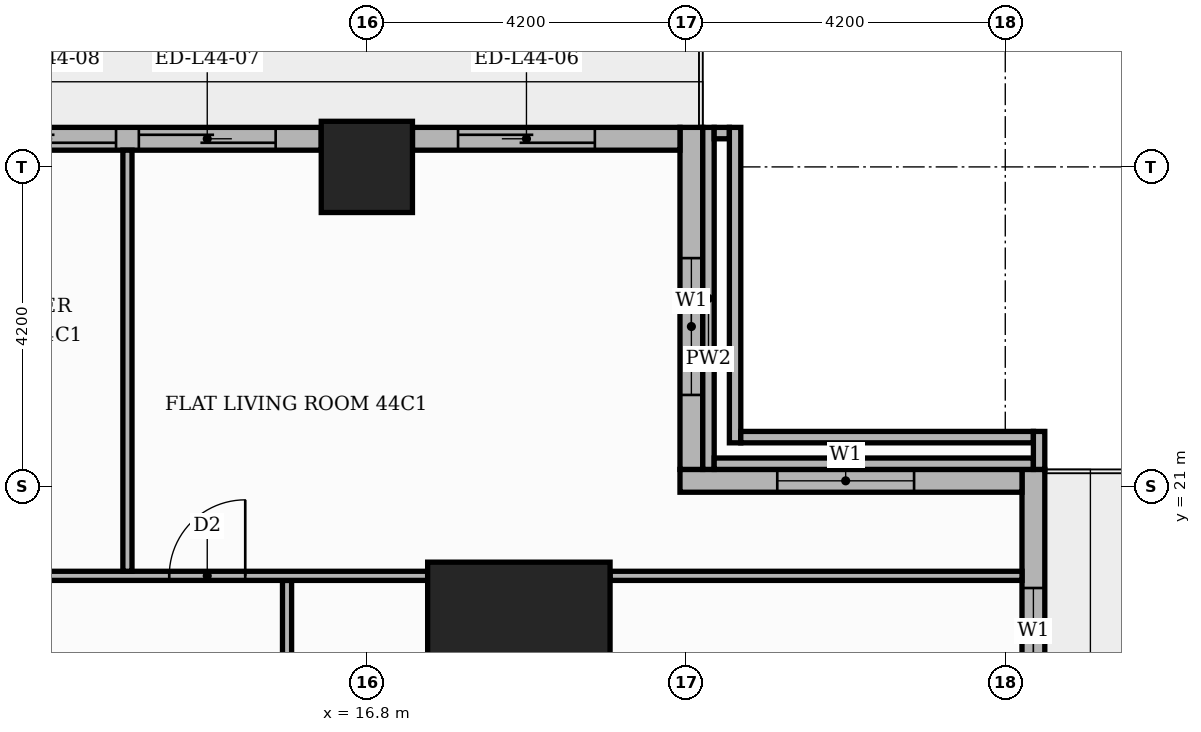
"""IFC4 building model, lengths in metres.
Left out: names, types, materials, properties, quantities, classifications, styles, units other than length and angle.
Written with IfcOpenShell. Run it as: python <this file> out.ifc"""

import sys

from ifc_helpers import new_model, si_unit, direction, frame, frame_2d, origin, origin_2d, place, context, subcontext, project, spatial, rectangle, extrude, element, fill, save


model = new_model("IFC4")
c1 = context("Model", 3, precision=1e-05, world=origin(), true_north=direction((0.0, 1.0)))
c2 = subcontext(c1, "Body", "Model", "MODEL_VIEW")
j1 = project(units=[si_unit("LENGTHUNIT", "METRE"), si_unit("PLANEANGLEUNIT", "RADIAN")], contexts=[c1])
p1 = place(None, origin())
s1 = spatial("IfcSite", under=j1, at=p1, CompositionType="ELEMENT")
p2 = place(p1, origin())
s2 = spatial("IfcBuilding", under=s1, at=p2, CompositionType="ELEMENT")
p3 = place(p2, frame((0.0, 0.0, 188.4)))
s3 = spatial("IfcBuildingStorey", under=s2, at=p3, CompositionType="ELEMENT", Elevation=188.4)
p4 = place(p3, frame((18.8, 18.8, 0.0), z_axis=(0.0, 0.0, 1.0), x_axis=(1.0, 0.0, 0.0)))
e1 = element("IfcColumn", 1, at=p4, inside=s3, PredefinedType="COLUMN", context=c2, shape_type="SweptSolid", body=[
    extrude(rectangle(XDim=2.4, YDim=2.4, at=origin_2d()), origin(), (0.0, 0.0, 1.0), 3.9),
])
p5 = place(p3, frame((16.8, 25.2, 0.0), z_axis=(0.0, 0.0, 1.0), x_axis=(1.0, 0.0, 0.0)))
e2 = element("IfcColumn", 2, at=p5, inside=s3, PredefinedType="COLUMN", context=c2, shape_type="SweptSolid", body=[
    extrude(rectangle(XDim=1.2, YDim=1.2, at=origin_2d()), origin(), (0.0, 0.0, 1.0), 3.9),
])
p6 = place(p3, frame((25.57, 17.4, 0.0), z_axis=(0.0, 0.0, 1.0), x_axis=(0.0, 1.0, 0.0)))
e3 = element("IfcWall", 3, at=p6, inside=s3, PredefinedType="STANDARD", context=c2, shape_type="SweptSolid", body=[
    extrude(rectangle(XDim=3.82, YDim=0.3, at=frame_2d((1.91, 0.0))), origin(), (0.0, 0.0, 1.0), 3.48),
])
p7 = place(p6, frame((0.46, 0.0, 0.9)))
e4 = element("IfcOpeningElement", 4, at=p7, cuts=e3, PredefinedType="OPENING", context=c2, shape_type="SweptSolid", body=[
    extrude(rectangle(XDim=1.8, YDim=2.1, at=frame_2d((0.9, 1.05))), frame((0.0, 0.16, 0.0), z_axis=(0.0, -1.0, 0.0), x_axis=(1.0, 0.0, 0.0)), (0.0, 0.0, 1.0), 0.32),
])
p8 = place(p3, frame((25.42, 21.07, 0.0), z_axis=(0.0, 0.0, 1.0), x_axis=(-1.0, 0.0, 0.0)))
e5 = element("IfcWall", 5, at=p8, inside=s3, PredefinedType="STANDARD", context=c2, shape_type="SweptSolid", body=[
    extrude(rectangle(XDim=4.5, YDim=0.3, at=frame_2d((2.25, 0.0))), origin(), (0.0, 0.0, 1.0), 3.48),
])
p9 = place(p8, frame((1.42, 0.0, 0.9)))
e6 = element("IfcOpeningElement", 6, at=p9, cuts=e5, PredefinedType="OPENING", context=c2, shape_type="SweptSolid", body=[
    extrude(rectangle(XDim=1.8, YDim=2.1, at=frame_2d((0.9, 1.05))), frame((0.0, 0.16, 0.0), z_axis=(0.0, -1.0, 0.0), x_axis=(1.0, 0.0, 0.0)), (0.0, 0.0, 1.0), 0.32),
])
p10 = place(p3, frame((21.07, 21.22, 0.0), z_axis=(0.0, 0.0, 1.0), x_axis=(0.0, 1.0, 0.0)))
e7 = element("IfcWall", 7, at=p10, inside=s3, PredefinedType="STANDARD", context=c2, shape_type="SweptSolid", body=[
    extrude(rectangle(XDim=4.5, YDim=0.3, at=frame_2d((2.25, 0.0))), origin(), (0.0, 0.0, 1.0), 3.48),
])
p11 = place(p10, frame((0.98, 0.0, 0.9)))
e8 = element("IfcOpeningElement", 8, at=p11, cuts=e7, PredefinedType="OPENING", context=c2, shape_type="SweptSolid", body=[
    extrude(rectangle(XDim=1.8, YDim=2.1, at=frame_2d((0.9, 1.05))), frame((0.0, 0.16, 0.0), z_axis=(0.0, -1.0, 0.0), x_axis=(1.0, 0.0, 0.0)), (0.0, 0.0, 1.0), 0.32),
])
p12 = place(p3, frame((20.92, 25.57, 0.0), z_axis=(0.0, 0.0, 1.0), x_axis=(-1.0, 0.0, 0.0)))
e9 = element("IfcWall", 9, at=p12, inside=s3, PredefinedType="STANDARD", context=c2, shape_type="SweptSolid", body=[
    extrude(rectangle(XDim=3.52, YDim=0.3, at=frame_2d((1.76, 0.0))), origin(), (0.0, 0.0, 1.0), 3.48),
])
p13 = place(p12, frame((1.12, 0.0, 0.0)))
e10 = element("IfcOpeningElement", 10, at=p13, cuts=e9, PredefinedType="OPENING", context=c2, shape_type="SweptSolid", body=[
    extrude(rectangle(XDim=1.8, YDim=2.4, at=frame_2d((0.9, 1.2))), frame((0.0, 0.16, 0.0), z_axis=(0.0, -1.0, 0.0), x_axis=(1.0, 0.0, 0.0)), (0.0, 0.0, 1.0), 0.32),
])
p14 = place(p3, frame((16.2, 25.57, 0.0), z_axis=(0.0, 0.0, 1.0), x_axis=(-1.0, 0.0, 0.0)))
e11 = element("IfcWall", 11, at=p14, inside=s3, PredefinedType="STANDARD", context=c2, shape_type="SweptSolid", body=[
    extrude(rectangle(XDim=7.2, YDim=0.3, at=frame_2d((3.6, 0.0))), origin(), (0.0, 0.0, 1.0), 3.48),
])
p15 = place(p14, frame((0.6, 0.0, 0.0)))
e12 = element("IfcOpeningElement", 12, at=p15, cuts=e11, PredefinedType="OPENING", context=c2, shape_type="SweptSolid", body=[
    extrude(rectangle(XDim=1.8, YDim=2.4, at=frame_2d((0.9, 1.2))), frame((0.0, 0.16, 0.0), z_axis=(0.0, -1.0, 0.0), x_axis=(1.0, 0.0, 0.0)), (0.0, 0.0, 1.0), 0.32),
])
p16 = place(p14, frame((2.7, 0.0, 0.0)))
e13 = element("IfcOpeningElement", 13, at=p16, cuts=e11, PredefinedType="OPENING", context=c2, shape_type="SweptSolid", body=[
    extrude(rectangle(XDim=1.8, YDim=2.4, at=frame_2d((0.9, 1.2))), frame((0.0, 0.16, 0.0), z_axis=(0.0, -1.0, 0.0), x_axis=(1.0, 0.0, 0.0)), (0.0, 0.0, 1.0), 0.32),
])
p17 = place(p14, frame((4.8, 0.0, 0.9)))
e14 = element("IfcOpeningElement", 14, at=p17, cuts=e11, PredefinedType="OPENING", context=c2, shape_type="SweptSolid", body=[
    extrude(rectangle(XDim=1.8, YDim=2.1, at=frame_2d((0.9, 1.05))), frame((0.0, 0.16, 0.0), z_axis=(0.0, -1.0, 0.0), x_axis=(1.0, 0.0, 0.0)), (0.0, 0.0, 1.0), 0.32),
])
p18 = place(p3, frame((21.295, 21.22, 0.0), z_axis=(0.0, 0.0, 1.0), x_axis=(0.0, 1.0, 0.0)))
e15 = element("IfcWall", 15, at=p18, inside=s3, PredefinedType="PARAPET", context=c2, shape_type="SweptSolid", body=[
    extrude(rectangle(XDim=4.5, YDim=0.15, at=frame_2d((2.25, 0.0))), origin(), (0.0, 0.0, 1.0), 1.1),
])
p19 = place(p3, frame((21.37, 25.645, 0.0), z_axis=(0.0, 0.0, 1.0), x_axis=(1.0, 0.0, 0.0)))
e16 = element("IfcWall", 16, at=p19, inside=s3, PredefinedType="PARAPET", context=c2, shape_type="SweptSolid", body=[
    extrude(rectangle(XDim=0.2, YDim=0.15, at=frame_2d((0.1, 0.0))), origin(), (0.0, 0.0, 1.0), 1.1),
])
p20 = place(p3, frame((21.37, 21.295, 0.0), z_axis=(0.0, 0.0, 1.0), x_axis=(1.0, 0.0, 0.0)))
e17 = element("IfcWall", 17, at=p20, inside=s3, PredefinedType="PARAPET", context=c2, shape_type="SweptSolid", body=[
    extrude(rectangle(XDim=4.2, YDim=0.15, at=frame_2d((2.1, 0.0))), origin(), (0.0, 0.0, 1.0), 1.1),
])
p21 = place(p3, frame((21.645, 21.57, 0.0), z_axis=(0.0, 0.0, 1.0), x_axis=(0.0, 1.0, 0.0)))
e18 = element("IfcWall", 18, at=p21, inside=s3, PredefinedType="PARAPET", context=c2, shape_type="SweptSolid", body=[
    extrude(rectangle(XDim=4.15, YDim=0.15, at=frame_2d((2.075, 0.0))), origin(), (0.0, 0.0, 1.0), 1.1),
])
p22 = place(p3, frame((21.72, 21.645, 0.0), z_axis=(0.0, 0.0, 1.0), x_axis=(1.0, 0.0, 0.0)))
e19 = element("IfcWall", 19, at=p22, inside=s3, PredefinedType="PARAPET", context=c2, shape_type="SweptSolid", body=[
    extrude(rectangle(XDim=3.85, YDim=0.15, at=frame_2d((1.925, 0.0))), origin(), (0.0, 0.0, 1.0), 1.1),
])
p23 = place(p3, frame((25.645, 21.22, 0.0), z_axis=(0.0, 0.0, 1.0), x_axis=(0.0, 1.0, 0.0)))
e20 = element("IfcWall", 20, at=p23, inside=s3, PredefinedType="PARAPET", context=c2, shape_type="SweptSolid", body=[
    extrude(rectangle(XDim=0.5, YDim=0.15, at=frame_2d((0.25, 0.0))), origin(), (0.0, 0.0, 1.0), 1.1),
])
p24 = place(p3, frame((15.75, 13.75, 0.0), z_axis=(0.0, 0.0, 1.0), x_axis=(0.0, 1.0, 0.0)))
e21 = element("IfcWall", 21, at=p24, inside=s3, PredefinedType="PARTITIONING", context=c2, shape_type="SweptSolid", body=[
    extrude(rectangle(XDim=6.01, YDim=0.12, at=frame_2d((3.005, 0.0))), origin(), (0.0, 0.0, 1.0), 3.48),
])
p25 = place(p24, frame((2.485, 0.0, 0.0)))
e22 = element("IfcOpeningElement", 22, at=p25, cuts=e21, PredefinedType="OPENING", context=c2, shape_type="SweptSolid", body=[
    extrude(rectangle(XDim=1.0, YDim=2.1, at=frame_2d((0.5, 1.05))), frame((0.0, 0.07, 0.0), z_axis=(0.0, -1.0, 0.0), x_axis=(1.0, 0.0, 0.0)), (0.0, 0.0, 1.0), 0.14),
])
p26 = place(p3, frame((5.35, 19.82, 0.0), z_axis=(0.0, 0.0, 1.0), x_axis=(1.0, 0.0, 0.0)))
e23 = element("IfcWall", 23, at=p26, inside=s3, PredefinedType="PARTITIONING", context=c2, shape_type="SweptSolid", body=[
    extrude(rectangle(XDim=12.25, YDim=0.12, at=frame_2d((6.125, 0.0))), origin(), (0.0, 0.0, 1.0), 3.48),
])
p27 = place(p26, frame((8.85, 0.0, 0.0)))
e24 = element("IfcOpeningElement", 24, at=p27, cuts=e23, PredefinedType="OPENING", context=c2, shape_type="SweptSolid", body=[
    extrude(rectangle(XDim=1.0, YDim=2.1, at=frame_2d((0.5, 1.05))), frame((0.0, 0.07, 0.0), z_axis=(0.0, -1.0, 0.0), x_axis=(1.0, 0.0, 0.0)), (0.0, 0.0, 1.0), 0.14),
])
p28 = place(p26, frame((5.75, 0.0, 0.0)))
e25 = element("IfcOpeningElement", 25, at=p28, cuts=e23, PredefinedType="OPENING", context=c2, shape_type="SweptSolid", body=[
    extrude(rectangle(XDim=0.9, YDim=2.1, at=frame_2d((0.45, 1.05))), frame((0.0, 0.07, 0.0), z_axis=(0.0, -1.0, 0.0), x_axis=(1.0, 0.0, 0.0)), (0.0, 0.0, 1.0), 0.14),
])
p29 = place(p3, frame((20.0, 19.82, 0.0), z_axis=(0.0, 0.0, 1.0), x_axis=(1.0, 0.0, 0.0)))
e26 = element("IfcWall", 26, at=p29, inside=s3, PredefinedType="PARTITIONING", context=c2, shape_type="SweptSolid", body=[
    extrude(rectangle(XDim=5.42, YDim=0.12, at=frame_2d((2.71, 0.0))), origin(), (0.0, 0.0, 1.0), 3.48),
])
p30 = place(p3, frame((13.65, 19.88, 0.0), z_axis=(0.0, 0.0, 1.0), x_axis=(0.0, 1.0, 0.0)))
e27 = element("IfcWall", 27, at=p30, inside=s3, PredefinedType="PARTITIONING", context=c2, shape_type="SweptSolid", body=[
    extrude(rectangle(XDim=5.54, YDim=0.12, at=frame_2d((2.77, 0.0))), origin(), (0.0, 0.0, 1.0), 3.48),
])
p31 = place(p7, origin())
e28 = element("IfcWindow", 28, at=p31, inside=s3, PartitioningType="SINGLE_PANEL", PredefinedType="WINDOW", context=c2, shape_type="SweptSolid", body=[
    extrude(rectangle(XDim=1.8, YDim=2.1, at=frame_2d((0.9, 1.05))), frame((0.0, 0.03, 0.0), z_axis=(0.0, -1.0, 0.0), x_axis=(1.0, 0.0, 0.0)), (0.0, 0.0, 1.0), 0.06),
])
fill(e4, e28)
p32 = place(p9, origin())
e29 = element("IfcWindow", 29, at=p32, inside=s3, PartitioningType="SINGLE_PANEL", PredefinedType="WINDOW", context=c2, shape_type="SweptSolid", body=[
    extrude(rectangle(XDim=1.8, YDim=2.1, at=frame_2d((0.9, 1.05))), frame((0.0, 0.03, 0.0), z_axis=(0.0, -1.0, 0.0), x_axis=(1.0, 0.0, 0.0)), (0.0, 0.0, 1.0), 0.06),
])
fill(e6, e29)
p33 = place(p11, origin())
e30 = element("IfcWindow", 30, at=p33, inside=s3, PartitioningType="SINGLE_PANEL", PredefinedType="WINDOW", context=c2, shape_type="SweptSolid", body=[
    extrude(rectangle(XDim=1.8, YDim=2.1, at=frame_2d((0.9, 1.05))), frame((0.0, 0.03, 0.0), z_axis=(0.0, -1.0, 0.0), x_axis=(1.0, 0.0, 0.0)), (0.0, 0.0, 1.0), 0.06),
])
fill(e8, e30)
p34 = place(p13, origin())
e31 = element("IfcDoor", 31, at=p34, inside=s3, OperationType="SLIDING_TO_RIGHT", PredefinedType="DOOR", context=c2, shape_type="SweptSolid", body=[
    extrude(rectangle(XDim=1.8, YDim=2.4, at=frame_2d((0.9, 1.2))), frame((0.0, 0.025, 0.0), z_axis=(0.0, -1.0, 0.0), x_axis=(1.0, 0.0, 0.0)), (0.0, 0.0, 1.0), 0.05),
])
fill(e10, e31)
p35 = place(p15, origin())
e32 = element("IfcDoor", 32, at=p35, inside=s3, OperationType="SLIDING_TO_LEFT", PredefinedType="DOOR", context=c2, shape_type="SweptSolid", body=[
    extrude(rectangle(XDim=1.8, YDim=2.4, at=frame_2d((0.9, 1.2))), frame((0.0, 0.025, 0.0), z_axis=(0.0, -1.0, 0.0), x_axis=(1.0, 0.0, 0.0)), (0.0, 0.0, 1.0), 0.05),
])
fill(e12, e32)
p36 = place(p16, origin())
e33 = element("IfcDoor", 33, at=p36, inside=s3, OperationType="SLIDING_TO_RIGHT", PredefinedType="DOOR", context=c2, shape_type="SweptSolid", body=[
    extrude(rectangle(XDim=1.8, YDim=2.4, at=frame_2d((0.9, 1.2))), frame((0.0, 0.025, 0.0), z_axis=(0.0, -1.0, 0.0), x_axis=(1.0, 0.0, 0.0)), (0.0, 0.0, 1.0), 0.05),
])
fill(e13, e33)
p37 = place(p27, origin())
e34 = element("IfcDoor", 34, at=p37, inside=s3, OperationType="SINGLE_SWING_RIGHT", PredefinedType="DOOR", context=c2, shape_type="SweptSolid", body=[
    extrude(rectangle(XDim=1.0, YDim=2.1, at=frame_2d((0.5, 1.05))), frame((0.0, 0.025, 0.0), z_axis=(0.0, -1.0, 0.0), x_axis=(1.0, 0.0, 0.0)), (0.0, 0.0, 1.0), 0.05),
])
fill(e24, e34)
save(model, sys.argv[1])
